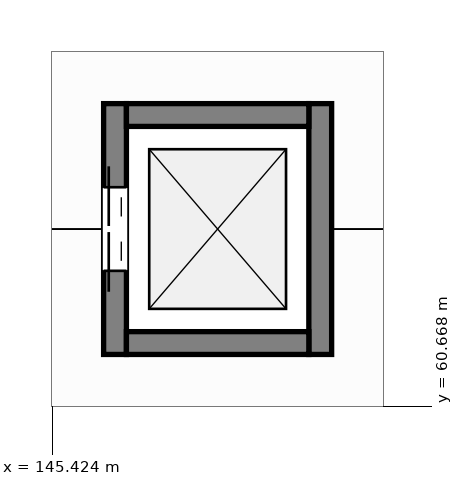
"""IFC4 building model, lengths in metres.
Left out: names, types, materials, properties, quantities, classifications, styles, units other than length and angle.
Written with IfcOpenShell. Run it as: python <this file> out.ifc"""

import sys

from ifc_helpers import new_model, si_unit, direction, frame, frame_2d, origin, place, context, subcontext, project, spatial, rectangle, extrude, element, fill, save


model = new_model("IFC4")
c1 = context("Model", 3, precision=1e-05, world=origin(), true_north=direction((0.0, 1.0)))
c2 = subcontext(c1, "Body", "Model", "MODEL_VIEW")
j1 = project(units=[si_unit("LENGTHUNIT", "METRE"), si_unit("PLANEANGLEUNIT", "RADIAN")], contexts=[c1])
p1 = place(None, origin())
s1 = spatial("IfcSite", under=j1, at=p1, CompositionType="ELEMENT")
p2 = place(p1, origin())
s2 = spatial("IfcBuilding", under=s1, at=p2, CompositionType="ELEMENT")
p3 = place(p2, frame((0.0, 0.0, 9.0)))
s3 = spatial("IfcBuildingStorey", under=s2, at=p3, CompositionType="ELEMENT", Elevation=9.0)
p4 = place(p3, frame((146.25, 61.35, 0.0), z_axis=(0.0, 0.0, 1.0), x_axis=(0.0, 1.0, 0.0)))
e1 = element("IfcWall", 1, at=p4, inside=s3, PredefinedType="SHEAR", context=c2, shape_type="SweptSolid", body=[
    extrude(rectangle(XDim=3.3, YDim=0.3, at=frame_2d((1.65, 0.0))), origin(), (0.0, 0.0, 1.0), 3.975),
])
p5 = place(p4, frame((1.1, 0.0, 0.0)))
e2 = element("IfcOpeningElement", 2, at=p5, cuts=e1, PredefinedType="OPENING", context=c2, shape_type="SweptSolid", body=[
    extrude(rectangle(XDim=1.1, YDim=2.15, at=frame_2d((0.55, 1.075))), frame((0.0, 0.16, 0.0), z_axis=(0.0, -1.0, 0.0), x_axis=(1.0, 0.0, 0.0)), (0.0, 0.0, 1.0), 0.32),
])
p6 = place(p3, frame((148.95, 61.35, 0.0), z_axis=(0.0, 0.0, 1.0), x_axis=(0.0, 1.0, 0.0)))
e3 = element("IfcWall", 3, at=p6, inside=s3, PredefinedType="SHEAR", context=c2, shape_type="SweptSolid", body=[
    extrude(rectangle(XDim=3.3, YDim=0.3, at=frame_2d((1.65, 0.0))), origin(), (0.0, 0.0, 1.0), 3.975),
])
for number, where, z_axis, x_axis in (
    (4, (146.4, 64.5, 0.0), (0.0, 0.0, 1.0), (1.0, 0.0, 0.0)),
    (5, (146.4, 61.5, 0.0), (0.0, 0.0, 1.0), (1.0, 0.0, 0.0)),
):
    element("IfcWall", number, at=place(p3, frame(where, z_axis=z_axis, x_axis=x_axis)), inside=s3, PredefinedType="SHEAR", context=c2, shape_type="SweptSolid", body=[
        extrude(rectangle(XDim=2.4, YDim=0.3, at=frame_2d((1.2, 0.0))), origin(), (0.0, 0.0, 1.0), 3.975),
    ])
p7 = place(p5, origin())
e6 = element("IfcDoor", 6, at=p7, inside=s3, OperationType="DOUBLE_DOOR_SLIDING", PredefinedType="DOOR", context=c2, shape_type="SweptSolid", body=[
    extrude(rectangle(XDim=1.1, YDim=2.15, at=frame_2d((0.55, 1.075))), frame((0.0, 0.025, 0.0), z_axis=(0.0, -1.0, 0.0), x_axis=(1.0, 0.0, 0.0)), (0.0, 0.0, 1.0), 0.05),
])
fill(e2, e6)
save(model, sys.argv[1])
